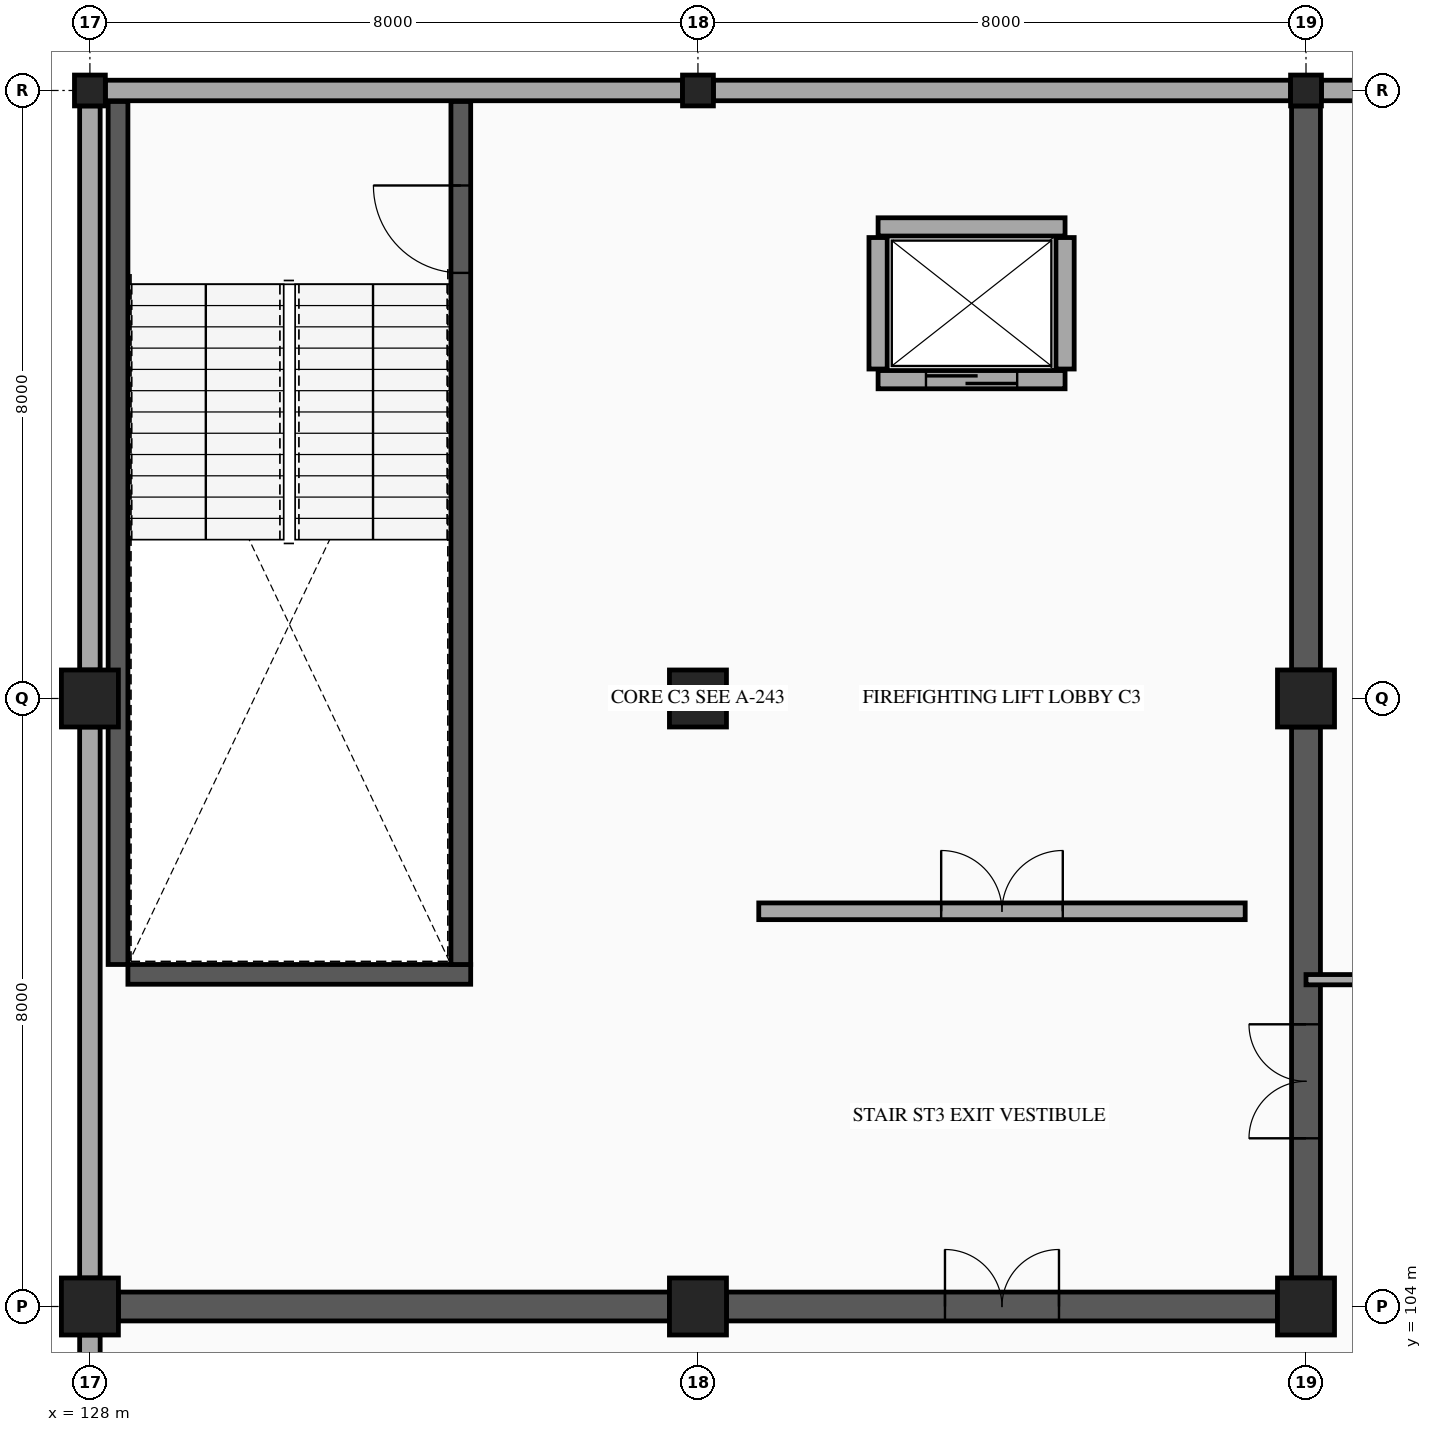
"""IFC4 building model, lengths in metres.
Left out: names, types, materials, properties, quantities, classifications, styles, units other than length and angle.
Written with IfcOpenShell. Run it as: python <this file> out.ifc"""

import sys

from ifc_helpers import new_model, si_unit, direction, frame, frame_2d, origin, origin_2d, place, context, subcontext, project, spatial, rectangle, hollow_rectangle, extrude, element, fill, save


model = new_model("IFC4")
c1 = context("Model", 3, precision=1e-05, world=origin(), true_north=direction((0.0, 1.0)))
c2 = subcontext(c1, "Body", "Model", "MODEL_VIEW")
j1 = project(units=[si_unit("LENGTHUNIT", "METRE"), si_unit("PLANEANGLEUNIT", "RADIAN")], contexts=[c1])
p1 = place(None, origin())
s1 = spatial("IfcSite", under=j1, at=p1, CompositionType="ELEMENT")
p2 = place(p1, origin())
s2 = spatial("IfcBuilding", under=s1, at=p2, CompositionType="ELEMENT")
p3 = place(p2, frame((0.0, 0.0, 28.4)))
s3 = spatial("IfcBuildingStorey", under=s2, at=p3, CompositionType="ELEMENT", Elevation=28.4)
for number, where, z_axis, x_axis in (
    (1, (128.0, 104.0, 0.0), (0.0, 0.0, 1.0), (1.0, 0.0, 0.0)),
    (2, (128.0, 112.0, 0.0), (0.0, 0.0, 1.0), (1.0, 0.0, 0.0)),
):
    element("IfcColumn", number, at=place(p3, frame(where, z_axis=z_axis, x_axis=x_axis)), inside=s3, PredefinedType="COLUMN", context=c2, shape_type="SweptSolid", body=[
        extrude(rectangle(XDim=0.75, YDim=0.75, at=origin_2d()), origin(), (0.0, 0.0, 1.0), 4.5),
    ])
p4 = place(p3, frame((128.0, 120.0, 0.0), z_axis=(0.0, 0.0, 1.0), x_axis=(1.0, 0.0, 0.0)))
e3 = element("IfcColumn", 3, at=p4, inside=s3, PredefinedType="COLUMN", context=c2, shape_type="SweptSolid", body=[
    extrude(hollow_rectangle(XDim=0.406, YDim=0.406, WallThickness=0.015, InnerFilletRadius=0.015, OuterFilletRadius=0.029, at=origin_2d()), origin(), (0.0, 0.0, 1.0), 4.5),
])
for number, where, z_axis, x_axis in (
    (4, (136.0, 104.0, 0.0), (0.0, 0.0, 1.0), (1.0, 0.0, 0.0)),
    (5, (136.0, 112.0, 0.0), (0.0, 0.0, 1.0), (1.0, 0.0, 0.0)),
):
    element("IfcColumn", number, at=place(p3, frame(where, z_axis=z_axis, x_axis=x_axis)), inside=s3, PredefinedType="COLUMN", context=c2, shape_type="SweptSolid", body=[
        extrude(rectangle(XDim=0.75, YDim=0.75, at=origin_2d()), origin(), (0.0, 0.0, 1.0), 4.5),
    ])
p5 = place(p3, frame((136.0, 120.0, 0.0), z_axis=(0.0, 0.0, 1.0), x_axis=(1.0, 0.0, 0.0)))
e6 = element("IfcColumn", 6, at=p5, inside=s3, PredefinedType="COLUMN", context=c2, shape_type="SweptSolid", body=[
    extrude(hollow_rectangle(XDim=0.406, YDim=0.406, WallThickness=0.015, InnerFilletRadius=0.015, OuterFilletRadius=0.029, at=origin_2d()), origin(), (0.0, 0.0, 1.0), 4.5),
])
for number, where, z_axis, x_axis in (
    (7, (144.0, 104.0, 0.0), (0.0, 0.0, 1.0), (1.0, 0.0, 0.0)),
    (8, (144.0, 112.0, 0.0), (0.0, 0.0, 1.0), (1.0, 0.0, 0.0)),
):
    element("IfcColumn", number, at=place(p3, frame(where, z_axis=z_axis, x_axis=x_axis)), inside=s3, PredefinedType="COLUMN", context=c2, shape_type="SweptSolid", body=[
        extrude(rectangle(XDim=0.75, YDim=0.75, at=origin_2d()), origin(), (0.0, 0.0, 1.0), 4.5),
    ])
p6 = place(p3, frame((144.0, 120.0, 0.0), z_axis=(0.0, 0.0, 1.0), x_axis=(1.0, 0.0, 0.0)))
e9 = element("IfcColumn", 9, at=p6, inside=s3, PredefinedType="COLUMN", context=c2, shape_type="SweptSolid", body=[
    extrude(hollow_rectangle(XDim=0.406, YDim=0.406, WallThickness=0.015, InnerFilletRadius=0.015, OuterFilletRadius=0.029, at=origin_2d()), origin(), (0.0, 0.0, 1.0), 4.5),
])
p7 = place(p3, frame((128.0, 96.375, 0.0), z_axis=(0.0, 0.0, 1.0), x_axis=(0.0, 1.0, 0.0)))
e10 = element("IfcWall", 10, at=p7, inside=s3, PredefinedType="STANDARD", context=c2, shape_type="SweptSolid", body=[
    extrude(rectangle(XDim=7.25, YDim=0.27, at=frame_2d((3.625, 0.0))), origin(), (0.0, 0.0, 1.0), 3.48),
])
p8 = place(p7, frame((2.85, 0.0, 0.8)))
e11 = element("IfcOpeningElement", 11, at=p8, cuts=e10, PredefinedType="OPENING", context=c2, shape_type="SweptSolid", body=[
    extrude(rectangle(XDim=1.55, YDim=1.4, at=frame_2d((0.775, 0.7))), frame((0.0, 0.145, 0.0), z_axis=(0.0, -1.0, 0.0), x_axis=(1.0, 0.0, 0.0)), (0.0, 0.0, 1.0), 0.29),
])
p9 = place(p3, frame((128.0, 104.375, 0.0), z_axis=(0.0, 0.0, 1.0), x_axis=(0.0, 1.0, 0.0)))
e12 = element("IfcWall", 12, at=p9, inside=s3, PredefinedType="STANDARD", context=c2, shape_type="SweptSolid", body=[
    extrude(rectangle(XDim=7.25, YDim=0.27, at=frame_2d((3.625, 0.0))), origin(), (0.0, 0.0, 1.0), 3.48),
])
p10 = place(p3, frame((128.0, 112.375, 0.0), z_axis=(0.0, 0.0, 1.0), x_axis=(0.0, 1.0, 0.0)))
e13 = element("IfcWall", 13, at=p10, inside=s3, PredefinedType="STANDARD", context=c2, shape_type="SweptSolid", body=[
    extrude(rectangle(XDim=7.422, YDim=0.27, at=frame_2d((3.711, 0.0))), origin(), (0.0, 0.0, 1.0), 3.48),
])
for number, where, z_axis, x_axis in (
    (14, (128.203, 120.0, 0.0), (0.0, 0.0, 1.0), (1.0, 0.0, 0.0)),
    (15, (136.203, 120.0, 0.0), (0.0, 0.0, 1.0), (1.0, 0.0, 0.0)),
):
    element("IfcWall", number, at=place(p3, frame(where, z_axis=z_axis, x_axis=x_axis)), inside=s3, PredefinedType="STANDARD", context=c2, shape_type="SweptSolid", body=[
        extrude(rectangle(XDim=7.594, YDim=0.27, at=frame_2d((3.797, 0.0))), origin(), (0.0, 0.0, 1.0), 3.48),
    ])
p11 = place(p3, frame((144.203, 120.0, 0.0), z_axis=(0.0, 0.0, 1.0), x_axis=(1.0, 0.0, 0.0)))
e16 = element("IfcWall", 16, at=p11, inside=s3, PredefinedType="STANDARD", context=c2, shape_type="SweptSolid", body=[
    extrude(rectangle(XDim=7.594, YDim=0.27, at=frame_2d((3.797, 0.0))), origin(), (0.0, 0.0, 1.0), 3.48),
])
p12 = place(p11, frame((3.022, 0.0, 0.8)))
e17 = element("IfcOpeningElement", 17, at=p12, cuts=e16, PredefinedType="OPENING", context=c2, shape_type="SweptSolid", body=[
    extrude(rectangle(XDim=1.55, YDim=1.4, at=frame_2d((0.775, 0.7))), frame((0.0, 0.145, 0.0), z_axis=(0.0, -1.0, 0.0), x_axis=(1.0, 0.0, 0.0)), (0.0, 0.0, 1.0), 0.29),
])
p13 = place(p3, frame((128.5, 108.37, 0.0), z_axis=(0.0, 0.0, 1.0), x_axis=(1.0, 0.0, 0.0)))
e18 = element("IfcWall", 18, at=p13, inside=s3, PredefinedType="SHEAR", context=c2, shape_type="SweptSolid", body=[
    extrude(rectangle(XDim=4.51, YDim=0.26, at=frame_2d((2.255, 0.0))), origin(), (0.0, 0.0, 1.0), 4.28),
])
p14 = place(p3, frame((128.37, 108.5, 0.0), z_axis=(0.0, 0.0, 1.0), x_axis=(0.0, 1.0, 0.0)))
e19 = element("IfcWall", 19, at=p14, inside=s3, PredefinedType="SHEAR", context=c2, shape_type="SweptSolid", body=[
    extrude(rectangle(XDim=11.355, YDim=0.26, at=frame_2d((5.677, 0.0))), origin(), (0.0, 0.0, 1.0), 4.28),
])
p15 = place(p3, frame((132.88, 108.5, 0.0), z_axis=(0.0, 0.0, 1.0), x_axis=(0.0, 1.0, 0.0)))
e20 = element("IfcWall", 20, at=p15, inside=s3, PredefinedType="SHEAR", context=c2, shape_type="SweptSolid", body=[
    extrude(rectangle(XDim=11.355, YDim=0.26, at=frame_2d((5.677, 0.0))), origin(), (0.0, 0.0, 1.0), 4.28),
])
p16 = place(p15, frame((9.1, 0.0, 0.0)))
e21 = element("IfcOpeningElement", 21, at=p16, cuts=e20, PredefinedType="OPENING", context=c2, shape_type="SweptSolid", body=[
    extrude(rectangle(XDim=1.15, YDim=2.15, at=frame_2d((0.575, 1.075))), frame((0.0, 0.14, 0.0), z_axis=(0.0, -1.0, 0.0), x_axis=(1.0, 0.0, 0.0)), (0.0, 0.0, 1.0), 0.28),
])
p17 = place(p3, frame((128.375, 104.0, 0.0), z_axis=(0.0, 0.0, 1.0), x_axis=(1.0, 0.0, 0.0)))
e22 = element("IfcWall", 22, at=p17, inside=s3, PredefinedType="SHEAR", context=c2, shape_type="SweptSolid", body=[
    extrude(rectangle(XDim=7.25, YDim=0.38, at=frame_2d((3.625, 0.0))), origin(), (0.0, 0.0, 1.0), 4.28),
])
p18 = place(p3, frame((136.375, 104.0, 0.0), z_axis=(0.0, 0.0, 1.0), x_axis=(1.0, 0.0, 0.0)))
e23 = element("IfcWall", 23, at=p18, inside=s3, PredefinedType="SHEAR", context=c2, shape_type="SweptSolid", body=[
    extrude(rectangle(XDim=7.25, YDim=0.38, at=frame_2d((3.625, 0.0))), origin(), (0.0, 0.0, 1.0), 4.28),
])
p19 = place(p18, frame((2.875, 0.0, 0.0)))
e24 = element("IfcOpeningElement", 24, at=p19, cuts=e23, PredefinedType="OPENING", context=c2, shape_type="SweptSolid", body=[
    extrude(rectangle(XDim=1.5, YDim=2.15, at=frame_2d((0.75, 1.075))), frame((0.0, 0.2, 0.0), z_axis=(0.0, -1.0, 0.0), x_axis=(1.0, 0.0, 0.0)), (0.0, 0.0, 1.0), 0.4),
])
p20 = place(p3, frame((144.0, 104.375, 0.0), z_axis=(0.0, 0.0, 1.0), x_axis=(0.0, 1.0, 0.0)))
e25 = element("IfcWall", 25, at=p20, inside=s3, PredefinedType="SHEAR", context=c2, shape_type="SweptSolid", body=[
    extrude(rectangle(XDim=7.25, YDim=0.38, at=frame_2d((3.625, 0.0))), origin(), (0.0, 0.0, 1.0), 4.28),
])
p21 = place(p20, frame((1.838, 0.0, 0.0)))
e26 = element("IfcOpeningElement", 26, at=p21, cuts=e25, PredefinedType="OPENING", context=c2, shape_type="SweptSolid", body=[
    extrude(rectangle(XDim=1.5, YDim=2.15, at=frame_2d((0.75, 1.075))), frame((0.0, 0.2, 0.0), z_axis=(0.0, -1.0, 0.0), x_axis=(1.0, 0.0, 0.0)), (0.0, 0.0, 1.0), 0.4),
])
p22 = place(p3, frame((144.0, 112.375, 0.0), z_axis=(0.0, 0.0, 1.0), x_axis=(0.0, 1.0, 0.0)))
e27 = element("IfcWall", 27, at=p22, inside=s3, PredefinedType="SHEAR", context=c2, shape_type="SweptSolid", body=[
    extrude(rectangle(XDim=7.422, YDim=0.38, at=frame_2d((3.711, 0.0))), origin(), (0.0, 0.0, 1.0), 4.28),
])
p23 = place(p3, frame((138.37, 116.195, 0.0), z_axis=(0.0, 0.0, 1.0), x_axis=(1.0, 0.0, 0.0)))
e28 = element("IfcWall", 28, at=p23, inside=s3, PredefinedType="PARTITIONING", context=c2, shape_type="SweptSolid", body=[
    extrude(rectangle(XDim=2.46, YDim=0.24, at=frame_2d((1.23, 0.0))), origin(), (0.0, 0.0, 1.0), 4.28),
])
p24 = place(p23, frame((0.63, 0.0, 0.0)))
e29 = element("IfcOpeningElement", 29, at=p24, cuts=e28, PredefinedType="OPENING", context=c2, shape_type="SweptSolid", body=[
    extrude(rectangle(XDim=1.2, YDim=2.15, at=frame_2d((0.6, 1.075))), frame((0.0, 0.13, 0.0), z_axis=(0.0, -1.0, 0.0), x_axis=(1.0, 0.0, 0.0)), (0.0, 0.0, 1.0), 0.26),
])
p25 = place(p3, frame((138.37, 118.205, 0.0), z_axis=(0.0, 0.0, 1.0), x_axis=(1.0, 0.0, 0.0)))
e30 = element("IfcWall", 30, at=p25, inside=s3, PredefinedType="PARTITIONING", context=c2, shape_type="SweptSolid", body=[
    extrude(rectangle(XDim=2.46, YDim=0.24, at=frame_2d((1.23, 0.0))), origin(), (0.0, 0.0, 1.0), 4.28),
])
for number, where, z_axis, x_axis in (
    (31, (138.37, 116.335, 0.0), (0.0, 0.0, 1.0), (0.0, 1.0, 0.0)),
    (32, (140.83, 116.335, 0.0), (0.0, 0.0, 1.0), (0.0, 1.0, 0.0)),
):
    element("IfcWall", number, at=place(p3, frame(where, z_axis=z_axis, x_axis=x_axis)), inside=s3, PredefinedType="PARTITIONING", context=c2, shape_type="SweptSolid", body=[
        extrude(rectangle(XDim=1.73, YDim=0.24, at=frame_2d((0.865, 0.0))), origin(), (0.0, 0.0, 1.0), 4.28),
    ])
p26 = place(p3, frame((136.8, 109.2, 0.0), z_axis=(0.0, 0.0, 1.0), x_axis=(1.0, 0.0, 0.0)))
e33 = element("IfcWall", 33, at=p26, inside=s3, PredefinedType="PARTITIONING", context=c2, shape_type="SweptSolid", body=[
    extrude(rectangle(XDim=6.4, YDim=0.22, at=frame_2d((3.2, 0.0))), origin(), (0.0, 0.0, 1.0), 3.48),
])
p27 = place(p26, frame((2.4, 0.0, 0.0)))
e34 = element("IfcOpeningElement", 34, at=p27, cuts=e33, PredefinedType="OPENING", context=c2, shape_type="SweptSolid", body=[
    extrude(rectangle(XDim=1.6, YDim=2.15, at=frame_2d((0.8, 1.075))), frame((0.0, 0.12, 0.0), z_axis=(0.0, -1.0, 0.0), x_axis=(1.0, 0.0, 0.0)), (0.0, 0.0, 1.0), 0.24),
])
p28 = place(p3, frame((144.0, 108.3, 0.0), z_axis=(0.0, 0.0, 1.0), x_axis=(1.0, 0.0, 0.0)))
e35 = element("IfcWall", 35, at=p28, inside=s3, PredefinedType="PARTITIONING", context=c2, shape_type="SweptSolid", body=[
    extrude(rectangle(XDim=17.4, YDim=0.135, at=frame_2d((8.7, 0.0))), origin(), (0.0, 0.0, 1.0), 3.48),
])
p29 = place(p28, frame((3.554, 0.0, 0.0)))
e36 = element("IfcOpeningElement", 36, at=p29, cuts=e35, PredefinedType="OPENING", context=c2, shape_type="SweptSolid", body=[
    extrude(rectangle(XDim=1.0, YDim=2.15, at=frame_2d((0.5, 1.075))), frame((0.0, 0.077, 0.0), z_axis=(0.0, -1.0, 0.0), x_axis=(1.0, 0.0, 0.0)), (0.0, 0.0, 1.0), 0.155),
])
p30 = place(p16, origin())
e37 = element("IfcDoor", 37, at=p30, inside=s3, OperationType="SINGLE_SWING_RIGHT", PredefinedType="DOOR", context=c2, shape_type="SweptSolid", body=[
    extrude(rectangle(XDim=1.15, YDim=2.15, at=frame_2d((0.575, 1.075))), frame((0.0, 0.025, 0.0), z_axis=(0.0, -1.0, 0.0), x_axis=(1.0, 0.0, 0.0)), (0.0, 0.0, 1.0), 0.05),
])
fill(e21, e37)
p31 = place(p19, origin())
e38 = element("IfcDoor", 38, at=p31, inside=s3, OperationType="DOUBLE_DOOR_SINGLE_SWING", PredefinedType="DOOR", context=c2, shape_type="SweptSolid", body=[
    extrude(rectangle(XDim=1.5, YDim=2.15, at=frame_2d((0.75, 1.075))), frame((0.0, 0.025, 0.0), z_axis=(0.0, -1.0, 0.0), x_axis=(1.0, 0.0, 0.0)), (0.0, 0.0, 1.0), 0.05),
])
fill(e24, e38)
p32 = place(p21, origin())
e39 = element("IfcDoor", 39, at=p32, inside=s3, OperationType="DOUBLE_DOOR_SINGLE_SWING", PredefinedType="DOOR", context=c2, shape_type="SweptSolid", body=[
    extrude(rectangle(XDim=1.5, YDim=2.15, at=frame_2d((0.75, 1.075))), frame((0.0, 0.025, 0.0), z_axis=(0.0, -1.0, 0.0), x_axis=(1.0, 0.0, 0.0)), (0.0, 0.0, 1.0), 0.05),
])
fill(e26, e39)
p33 = place(p24, origin())
e40 = element("IfcDoor", 40, at=p33, inside=s3, OperationType="SLIDING_TO_LEFT", PredefinedType="DOOR", context=c2, shape_type="SweptSolid", body=[
    extrude(rectangle(XDim=1.2, YDim=2.15, at=frame_2d((0.6, 1.075))), frame((0.0, 0.025, 0.0), z_axis=(0.0, -1.0, 0.0), x_axis=(1.0, 0.0, 0.0)), (0.0, 0.0, 1.0), 0.05),
])
fill(e29, e40)
p34 = place(p27, origin())
e41 = element("IfcDoor", 41, at=p34, inside=s3, OperationType="DOUBLE_DOOR_SINGLE_SWING", PredefinedType="DOOR", context=c2, shape_type="SweptSolid", body=[
    extrude(rectangle(XDim=1.6, YDim=2.15, at=frame_2d((0.8, 1.075))), frame((0.0, 0.025, 0.0), z_axis=(0.0, -1.0, 0.0), x_axis=(1.0, 0.0, 0.0)), (0.0, 0.0, 1.0), 0.05),
])
fill(e34, e41)
save(model, sys.argv[1])
